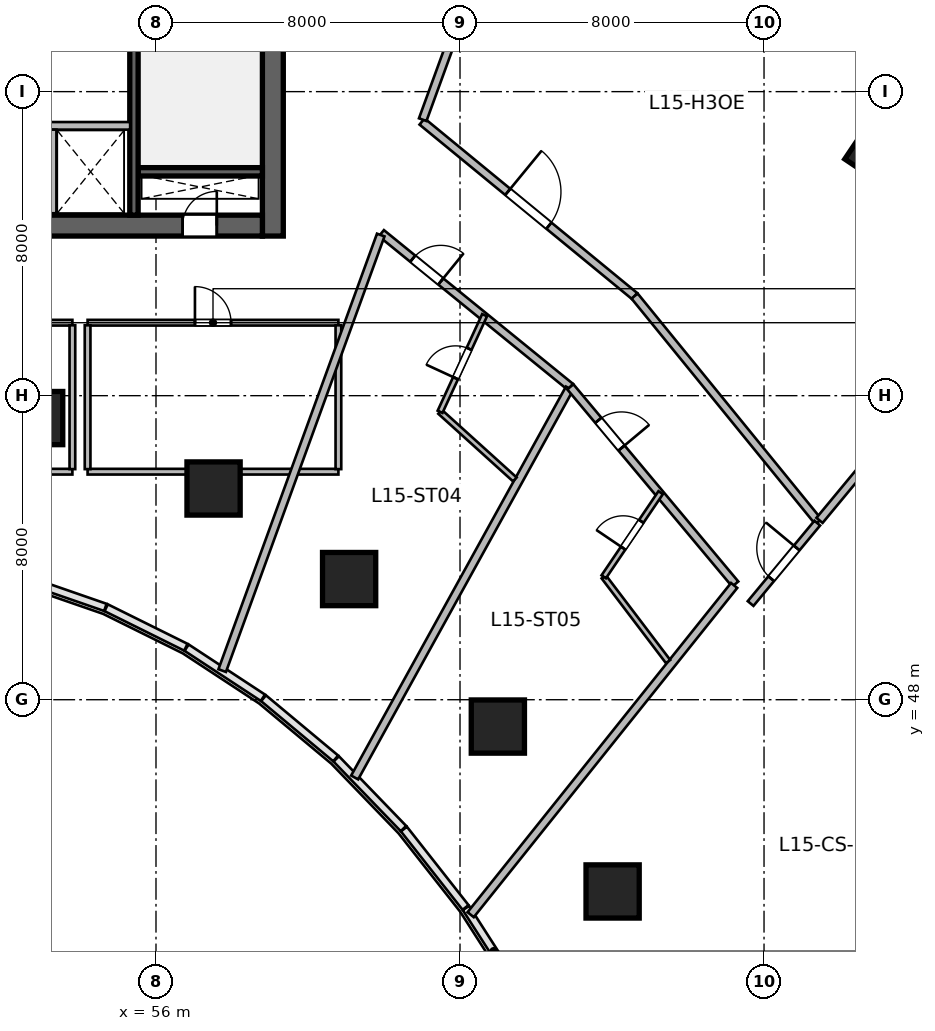
"""IFC4 building model, lengths in metres.
Left out: names, types, materials, properties, quantities, classifications, styles, units other than length and angle.
Written with IfcOpenShell. Run it as: python <this file> out.ifc"""

import sys

from ifc_helpers import new_model, si_unit, direction, frame, frame_2d, origin, origin_2d, place, context, subcontext, project, spatial, rectangle, circle, extrude, source, transform, mapped, element, fill, save


model = new_model("IFC4")
c1 = context("Model", 3, precision=1e-05, world=origin(), true_north=direction((0.0, 1.0)))
c2 = subcontext(c1, "Body", "Model", "MODEL_VIEW")
j1 = project(units=[si_unit("LENGTHUNIT", "METRE"), si_unit("PLANEANGLEUNIT", "RADIAN")], contexts=[c1])
p1 = place(None, origin())
s1 = spatial("IfcSite", under=j1, at=p1, CompositionType="ELEMENT")
p2 = place(p1, origin())
s2 = spatial("IfcBuilding", under=s1, at=p2, CompositionType="ELEMENT")
p3 = place(p2, frame((0.0, 0.0, 67.8)))
s3 = spatial("IfcBuildingStorey", under=s2, at=p3, CompositionType="ELEMENT", Elevation=67.8)
m1 = source(origin(), c2, "Body", "SweptSolid", [
    extrude(rectangle(XDim=12.0, YDim=0.55, at=frame_2d((6.0, 0.0))), origin(), (0.0, 0.0, 1.0), 3.6),
])
p4 = place(p3, frame((59.075, 60.2, 0.0), z_axis=(0.0, 0.0, 1.0), x_axis=(0.0, 1.0, 0.0)))
e1 = element("IfcWall", 1, at=p4, inside=s3, PredefinedType="SHEAR", context=c2, shape_type="MappedRepresentation", body=[
    mapped(m1, transform((0.0, 0.0, 0.0), scale=1.0)),
])
m2 = source(origin(), c2, "Body", "SweptSolid", [
    extrude(rectangle(XDim=21.6, YDim=0.55, at=frame_2d((10.8, 0.0))), origin(), (0.0, 0.0, 1.0), 3.6),
])
p5 = place(p3, frame((37.2, 60.475, 0.0), z_axis=(0.0, 0.0, 1.0), x_axis=(1.0, 0.0, 0.0)))
e2 = element("IfcWall", 2, at=p5, inside=s3, PredefinedType="SHEAR", context=c2, shape_type="MappedRepresentation", body=[
    mapped(m2, transform((0.0, 0.0, 0.0), scale=1.0)),
])
p6 = place(p5, frame((1.1, 0.0, 0.0)))
e3 = element("IfcOpeningElement", 3, at=p6, cuts=e2, PredefinedType="OPENING", context=c2, shape_type="SweptSolid", body=[
    extrude(rectangle(XDim=1.15, YDim=2.15, at=frame_2d((0.575, 1.075))), frame((0.0, 0.285, 0.0), z_axis=(0.0, -1.0, 0.0), x_axis=(1.0, 0.0, 0.0)), (0.0, 0.0, 1.0), 0.57),
])
p7 = place(p5, frame((19.5, 0.0, 0.0)))
e4 = element("IfcOpeningElement", 4, at=p7, cuts=e2, PredefinedType="OPENING", context=c2, shape_type="SweptSolid", body=[
    extrude(rectangle(XDim=0.9, YDim=2.1, at=frame_2d((0.45, 1.05))), frame((0.0, 0.285, 0.0), z_axis=(0.0, -1.0, 0.0), x_axis=(1.0, 0.0, 0.0)), (0.0, 0.0, 1.0), 0.57),
])
p8 = place(p5, frame((12.02, 0.0, 0.0)))
e5 = element("IfcOpeningElement", 5, at=p8, cuts=e2, PredefinedType="OPENING", context=c2, shape_type="SweptSolid", body=[
    extrude(rectangle(XDim=1.6, YDim=2.15, at=frame_2d((0.8, 1.075))), frame((0.0, 0.285, 0.0), z_axis=(0.0, -1.0, 0.0), x_axis=(1.0, 0.0, 0.0)), (0.0, 0.0, 1.0), 0.57),
])
m3 = source(origin(), c2, "Body", "SweptSolid", [
    extrude(rectangle(XDim=3.27, YDim=0.22, at=frame_2d((1.635, 0.0))), origin(), (0.0, 0.0, 1.0), 3.6),
])
p9 = place(p3, frame((55.53, 61.89, 0.0), z_axis=(0.0, 0.0, 1.0), x_axis=(1.0, 0.0, 0.0)))
e6 = element("IfcWall", 6, at=p9, inside=s3, PredefinedType="SHEAR", context=c2, shape_type="MappedRepresentation", body=[
    mapped(m3, transform((0.0, 0.0, 0.0), scale=1.0)),
])
m4 = source(origin(), c2, "Body", "SweptSolid", [
    extrude(rectangle(XDim=10.9, YDim=0.22, at=frame_2d((5.45, 0.0))), origin(), (0.0, 0.0, 1.0), 3.6),
])
p10 = place(p3, frame((55.42, 60.75, 0.0), z_axis=(0.0, 0.0, 1.0), x_axis=(0.0, 1.0, 0.0)))
e7 = element("IfcWall", 7, at=p10, inside=s3, PredefinedType="SHEAR", context=c2, shape_type="MappedRepresentation", body=[
    mapped(m4, transform((0.0, 0.0, 0.0), scale=1.0)),
])
p11 = place(p10, frame((9.495, 0.0, 0.0)))
e8 = element("IfcOpeningElement", 8, at=p11, cuts=e7, PredefinedType="OPENING", context=c2, shape_type="SweptSolid", body=[
    extrude(rectangle(XDim=1.15, YDim=2.15, at=frame_2d((0.575, 1.075))), frame((0.0, 0.12, 0.0), z_axis=(0.0, -1.0, 0.0), x_axis=(1.0, 0.0, 0.0)), (0.0, 0.0, 1.0), 0.24),
])
m5 = source(origin(), c2, "Body", "SweptSolid", [
    extrude(circle(Radius=0.7, at=origin_2d()), origin(), (0.0, 0.0, 1.0), 3.6),
])
for number, where, z_axis, x_axis in (
    (9, (52.846, 55.411, 0.0), (0.0, 0.0, 1.0), (0.143, 0.99, 0.0)),
    (10, (57.515, 53.558, 0.0), (0.0, 0.0, 1.0), (0.289, 0.957, 0.0)),
    (11, (61.082, 51.175, 0.0), (0.0, 0.0, 1.0), (0.409, 0.912, 0.0)),
    (12, (64.996, 47.294, 0.0), (0.0, 0.0, 1.0), (0.558, 0.83, 0.0)),
):
    element("IfcColumn", number, at=place(p3, frame(where, z_axis=z_axis, x_axis=x_axis)), inside=s3, PredefinedType="COLUMN", context=c2, shape_type="MappedRepresentation", body=[
        mapped(m5, transform((0.0, 0.0, 0.0), scale=1.0)),
    ])
m6 = source(origin(), c2, "Body", "SweptSolid", [
    extrude(rectangle(XDim=1.5, YDim=1.5, at=origin_2d()), origin(), (0.0, 0.0, 1.0), 3.6),
])
p12 = place(p3, frame((75.167, 62.43, 0.0), z_axis=(0.0, 0.0, 1.0), x_axis=(0.55774510898, 0.830012285095, 0.0)))
e13 = element("IfcColumn", 13, at=p12, inside=s3, PredefinedType="COLUMN", context=c2, shape_type="MappedRepresentation", body=[
    mapped(m6, transform((0.0, 0.0, 0.0), scale=1.0)),
])
p13 = place(p3, frame((68.015, 42.955, 0.0), z_axis=(0.0, 0.0, 1.0), x_axis=(0.690756218984, 0.723087716626, 0.0)))
e14 = element("IfcColumn", 14, at=p13, inside=s3, PredefinedType="COLUMN", context=c2, shape_type="MappedRepresentation", body=[
    mapped(m5, transform((0.0, 0.0, 0.0), scale=1.0)),
])
m7 = source(origin(), c2, "Body", "SweptSolid", [
    extrude(rectangle(XDim=4.1, YDim=0.2, at=frame_2d((2.05, 0.0))), origin(), (0.0, 0.0, 1.0), 3.36),
])
p14 = place(p3, frame((51.22, 63.1, 0.0), z_axis=(0.0, 0.0, 1.0), x_axis=(1.0, 0.0, 0.0)))
e15 = element("IfcWall", 15, at=p14, inside=s3, PredefinedType="SOLIDWALL", context=c2, shape_type="MappedRepresentation", body=[
    mapped(m7, transform((0.0, 0.0, 0.0), scale=1.0)),
])
m8 = source(origin(), c2, "Body", "SweptSolid", [
    extrude(rectangle(XDim=2.2, YDim=0.2, at=frame_2d((1.1, 0.0))), origin(), (0.0, 0.0, 1.0), 3.36),
])
p15 = place(p3, frame((53.28, 60.8, 0.0), z_axis=(0.0, 0.0, 1.0), x_axis=(0.0, 1.0, 0.0)))
e16 = element("IfcWall", 16, at=p15, inside=s3, PredefinedType="SOLIDWALL", context=c2, shape_type="MappedRepresentation", body=[
    mapped(m8, transform((0.0, 0.0, 0.0), scale=1.0)),
])
m9 = source(origin(), c2, "Body", "SweptSolid", [
    extrude(rectangle(XDim=11.6, YDim=0.15, at=frame_2d((5.8, 0.0))), origin(), (0.0, 0.0, 1.0), 3.36),
])
p16 = place(p3, frame((42.2, 54.0, 0.0), z_axis=(0.0, 0.0, 1.0), x_axis=(1.0, 0.0, 0.0)))
e17 = element("IfcWall", 17, at=p16, inside=s3, PredefinedType="PARTITIONING", context=c2, shape_type="MappedRepresentation", body=[
    mapped(m9, transform((0.0, 0.0, 0.0), scale=1.0)),
])
p17 = place(p3, frame((42.2, 57.92, 0.0), z_axis=(0.0, 0.0, 1.0), x_axis=(1.0, 0.0, 0.0)))
e18 = element("IfcWall", 18, at=p17, inside=s3, PredefinedType="PARTITIONING", context=c2, shape_type="MappedRepresentation", body=[
    mapped(m9, transform((0.0, 0.0, 0.0), scale=1.0)),
])
p18 = place(p17, frame((6.9, 0.0, 0.0)))
e19 = element("IfcOpeningElement", 19, at=p18, cuts=e18, PredefinedType="OPENING", context=c2, shape_type="SweptSolid", body=[
    extrude(rectangle(XDim=1.1, YDim=2.15, at=frame_2d((0.55, 1.075))), frame((0.0, 0.085, 0.0), z_axis=(0.0, -1.0, 0.0), x_axis=(1.0, 0.0, 0.0)), (0.0, 0.0, 1.0), 0.17),
])
m10 = source(origin(), c2, "Body", "SweptSolid", [
    extrude(rectangle(XDim=3.785, YDim=0.15, at=frame_2d((1.893, 0.0))), origin(), (0.0, 0.0, 1.0), 3.36),
])
p19 = place(p3, frame((53.8, 54.067, 0.0), z_axis=(0.0, 0.0, 1.0), x_axis=(0.0, 1.0, 0.0)))
e20 = element("IfcWall", 20, at=p19, inside=s3, PredefinedType="PARTITIONING", context=c2, shape_type="MappedRepresentation", body=[
    mapped(m10, transform((0.0, 0.0, 0.0), scale=1.0)),
])
m11 = source(origin(), c2, "Body", "SweptSolid", [
    extrude(rectangle(XDim=6.6, YDim=0.15, at=frame_2d((3.3, 0.0))), origin(), (0.0, 0.0, 1.0), 2.803),
])
p20 = place(p3, frame((54.2, 54.0, 0.0), z_axis=(0.0, 0.0, 1.0), x_axis=(1.0, 0.0, 0.0)))
e21 = element("IfcWall", 21, at=p20, inside=s3, PredefinedType="PARTITIONING", context=c2, shape_type="MappedRepresentation", body=[
    mapped(m11, transform((0.0, 0.0, 0.0), scale=1.0)),
])
m12 = source(origin(), c2, "Body", "SweptSolid", [
    extrude(rectangle(XDim=6.6, YDim=0.15, at=frame_2d((3.3, 0.0))), origin(), (0.0, 0.0, 1.0), 3.36),
])
p21 = place(p3, frame((54.2, 57.92, 0.0), z_axis=(0.0, 0.0, 1.0), x_axis=(1.0, 0.0, 0.0)))
e22 = element("IfcWall", 22, at=p21, inside=s3, PredefinedType="PARTITIONING", context=c2, shape_type="MappedRepresentation", body=[
    mapped(m12, transform((0.0, 0.0, 0.0), scale=1.0)),
])
p22 = place(p21, frame((2.825, 0.0, 0.0)))
e23 = element("IfcOpeningElement", 23, at=p22, cuts=e22, PredefinedType="OPENING", context=c2, shape_type="SweptSolid", body=[
    extrude(rectangle(XDim=0.95, YDim=2.1, at=frame_2d((0.475, 1.05))), frame((0.0, 0.085, 0.0), z_axis=(0.0, -1.0, 0.0), x_axis=(1.0, 0.0, 0.0)), (0.0, 0.0, 1.0), 0.17),
])
for number, where, z_axis, x_axis in (
    (24, (54.2, 54.067, 0.0), (0.0, 0.0, 1.0), (0.0, 1.0, 0.0)),
    (25, (60.8, 54.067, 0.0), (0.0, 0.0, 1.0), (0.0, 1.0, 0.0)),
):
    element("IfcWall", number, at=place(p3, frame(where, z_axis=z_axis, x_axis=x_axis)), inside=s3, PredefinedType="PARTITIONING", context=c2, shape_type="MappedRepresentation", body=[
        mapped(m10, transform((0.0, 0.0, 0.0), scale=1.0)),
    ])
m13 = source(origin(), c2, "Body", "SweptSolid", [
    extrude(rectangle(XDim=7.237, YDim=0.21, at=frame_2d((3.618, 0.0))), origin(), (0.0, 0.0, 1.0), 3.36),
])
p23 = place(p3, frame((63.001, 63.214, 0.0), z_axis=(0.0, 0.0, 1.0), x_axis=(0.772813707793, -0.634632943557, 0.0)))
e26 = element("IfcWall", 26, at=p23, inside=s3, PredefinedType="PARTITIONING", context=c2, shape_type="MappedRepresentation", body=[
    mapped(m13, transform((0.0, 0.0, 0.0), scale=1.0)),
])
p24 = place(p23, frame((2.918, 0.0, 0.0)))
e27 = element("IfcOpeningElement", 27, at=p24, cuts=e26, PredefinedType="OPENING", context=c2, shape_type="SweptSolid", body=[
    extrude(rectangle(XDim=1.4, YDim=2.15, at=frame_2d((0.7, 1.075))), frame((0.0, 0.115, 0.0), z_axis=(0.0, -1.0, 0.0), x_axis=(1.0, 0.0, 0.0)), (0.0, 0.0, 1.0), 0.23),
])
m14 = source(origin(), c2, "Body", "SweptSolid", [
    extrude(rectangle(XDim=7.659, YDim=0.21, at=frame_2d((3.829, 0.0))), origin(), (0.0, 0.0, 1.0), 3.36),
])
p25 = place(p3, frame((68.594, 58.621, 0.0), z_axis=(0.0, 0.0, 1.0), x_axis=(0.631489868862, -0.775384127723, 0.0)))
e28 = element("IfcWall", 28, at=p25, inside=s3, PredefinedType="PARTITIONING", context=c2, shape_type="MappedRepresentation", body=[
    mapped(m14, transform((0.0, 0.0, 0.0), scale=1.0)),
])
m15 = source(origin(), c2, "Body", "SweptSolid", [
    extrude(rectangle(XDim=12.088, YDim=0.21, at=frame_2d((6.044, 0.0))), origin(), (0.0, 0.0, 1.0), 3.36),
])
p26 = place(p3, frame((63.019, 63.262, 0.0), z_axis=(0.0, 0.0, 1.0), x_axis=(0.34203007529, 0.939689005787, 0.0)))
e29 = element("IfcWall", 29, at=p26, inside=s3, PredefinedType="PARTITIONING", context=c2, shape_type="MappedRepresentation", body=[
    mapped(m15, transform((0.0, 0.0, 0.0), scale=1.0)),
])
m16 = source(origin(), c2, "Body", "SweptSolid", [
    extrude(rectangle(XDim=10.975, YDim=0.21, at=frame_2d((5.487, 0.0))), origin(), (0.0, 0.0, 1.0), 3.36),
])
p27 = place(p3, frame((73.46, 52.719, 0.0), z_axis=(0.0, 0.0, 1.0), x_axis=(0.638125265812, 0.769932558821, 0.0)))
e30 = element("IfcWall", 30, at=p27, inside=s3, PredefinedType="PARTITIONING", context=c2, shape_type="MappedRepresentation", body=[
    mapped(m16, transform((0.0, 0.0, 0.0), scale=1.0)),
])
m17 = source(origin(), c2, "Body", "SweptSolid", [
    extrude(rectangle(XDim=6.408, YDim=0.21, at=frame_2d((3.204, 0.0))), origin(), (0.0, 0.0, 1.0), 3.36),
])
p28 = place(p3, frame((61.931, 60.275, 0.0), z_axis=(0.0, 0.0, 1.0), x_axis=(0.775878552904, -0.630882295792, 0.0)))
e31 = element("IfcWall", 31, at=p28, inside=s3, PredefinedType="PARTITIONING", context=c2, shape_type="MappedRepresentation", body=[
    mapped(m17, transform((0.0, 0.0, 0.0), scale=1.0)),
])
p29 = place(p28, frame((1.063, 0.0, 0.0)))
e32 = element("IfcOpeningElement", 32, at=p29, cuts=e31, PredefinedType="OPENING", context=c2, shape_type="SweptSolid", body=[
    extrude(rectangle(XDim=0.95, YDim=2.15, at=frame_2d((0.475, 1.075))), frame((0.0, 0.115, 0.0), z_axis=(0.0, -1.0, 0.0), x_axis=(1.0, 0.0, 0.0)), (0.0, 0.0, 1.0), 0.23),
])
m18 = source(origin(), c2, "Body", "SweptSolid", [
    extrude(rectangle(XDim=12.196, YDim=0.21, at=frame_2d((6.098, 0.0))), origin(), (0.0, 0.0, 1.0), 3.36),
])
p30 = place(p3, frame((57.742, 48.766, 0.0), z_axis=(0.0, 0.0, 1.0), x_axis=(0.342022711534, 0.939691686031, 0.0)))
e33 = element("IfcWall", 33, at=p30, inside=s3, PredefinedType="PARTITIONING", context=c2, shape_type="MappedRepresentation", body=[
    mapped(m18, transform((0.0, 0.0, 0.0), scale=1.0)),
])
m19 = source(origin(), c2, "Body", "SweptSolid", [
    extrude(rectangle(XDim=11.692, YDim=0.21, at=frame_2d((5.846, 0.0))), origin(), (0.0, 0.0, 1.0), 3.093),
])
p31 = place(p3, frame((61.228, 45.954, 0.0), z_axis=(0.0, 0.0, 1.0), x_axis=(0.483398579324, 0.875400373262, 0.0)))
e34 = element("IfcWall", 34, at=p31, inside=s3, PredefinedType="PARTITIONING", context=c2, shape_type="MappedRepresentation", body=[
    mapped(m19, transform((0.0, 0.0, 0.0), scale=1.0)),
])
m20 = source(origin(), c2, "Body", "SweptSolid", [
    extrude(rectangle(XDim=2.653, YDim=0.14, at=frame_2d((1.327, 0.0))), origin(), (0.0, 0.0, 1.0), 2.877),
])
p32 = place(p3, frame((63.475, 55.576, 0.0), z_axis=(0.0, 0.0, 1.0), x_axis=(0.741731938744, -0.67069645224, 0.0)))
e35 = element("IfcWall", 35, at=p32, inside=s3, PredefinedType="PARTITIONING", context=c2, shape_type="MappedRepresentation", body=[
    mapped(m20, transform((0.0, 0.0, 0.0), scale=1.0)),
])
m21 = source(origin(), c2, "Body", "SweptSolid", [
    extrude(rectangle(XDim=2.799, YDim=0.14, at=frame_2d((1.4, 0.0))), origin(), (0.0, 0.0, 1.0), 3.36),
])
p33 = place(p3, frame((63.475, 55.576, 0.0), z_axis=(0.0, 0.0, 1.0), x_axis=(0.418626740412, 0.908158384981, 0.0)))
e36 = element("IfcWall", 36, at=p33, inside=s3, PredefinedType="PARTITIONING", context=c2, shape_type="MappedRepresentation", body=[
    mapped(m21, transform((0.0, 0.0, 0.0), scale=1.0)),
])
p34 = place(p33, frame((0.975, 0.0, 0.0)))
e37 = element("IfcOpeningElement", 37, at=p34, cuts=e36, PredefinedType="OPENING", context=c2, shape_type="SweptSolid", body=[
    extrude(rectangle(XDim=0.85, YDim=2.05, at=frame_2d((0.425, 1.025))), frame((0.0, 0.08, 0.0), z_axis=(0.0, -1.0, 0.0), x_axis=(1.0, 0.0, 0.0)), (0.0, 0.0, 1.0), 0.16),
])
m22 = source(origin(), c2, "Body", "SweptSolid", [
    extrude(rectangle(XDim=6.764, YDim=0.21, at=frame_2d((3.382, 0.0))), origin(), (0.0, 0.0, 1.0), 3.36),
])
p35 = place(p3, frame((66.904, 56.232, 0.0), z_axis=(0.0, 0.0, 1.0), x_axis=(0.641433176235, -0.767178910311, 0.0)))
e38 = element("IfcWall", 38, at=p35, inside=s3, PredefinedType="PARTITIONING", context=c2, shape_type="MappedRepresentation", body=[
    mapped(m22, transform((0.0, 0.0, 0.0), scale=1.0)),
])
p36 = place(p35, frame((1.148, 0.0, 0.0)))
e39 = element("IfcOpeningElement", 39, at=p36, cuts=e38, PredefinedType="OPENING", context=c2, shape_type="SweptSolid", body=[
    extrude(rectangle(XDim=0.95, YDim=2.15, at=frame_2d((0.475, 1.075))), frame((0.0, 0.115, 0.0), z_axis=(0.0, -1.0, 0.0), x_axis=(1.0, 0.0, 0.0)), (0.0, 0.0, 1.0), 0.23),
])
m23 = source(origin(), c2, "Body", "SweptSolid", [
    extrude(rectangle(XDim=11.095, YDim=0.21, at=frame_2d((5.548, 0.0))), origin(), (0.0, 0.0, 1.0), 3.093),
])
p37 = place(p3, frame((64.281, 42.344, 0.0), z_axis=(0.0, 0.0, 1.0), x_axis=(0.6248131083, 0.780774346208, 0.0)))
e40 = element("IfcWall", 40, at=p37, inside=s3, PredefinedType="PARTITIONING", context=c2, shape_type="MappedRepresentation", body=[
    mapped(m23, transform((0.0, 0.0, 0.0), scale=1.0)),
])
m24 = source(origin(), c2, "Body", "SweptSolid", [
    extrude(rectangle(XDim=2.8, YDim=0.14, at=frame_2d((1.4, 0.0))), origin(), (0.0, 0.0, 1.0), 2.877),
])
p38 = place(p3, frame((67.782, 51.234, 0.0), z_axis=(0.0, 0.0, 1.0), x_axis=(0.604607833789, -0.796523299923, 0.0)))
e41 = element("IfcWall", 41, at=p38, inside=s3, PredefinedType="PARTITIONING", context=c2, shape_type="MappedRepresentation", body=[
    mapped(m24, transform((0.0, 0.0, 0.0), scale=1.0)),
])
m25 = source(origin(), c2, "Body", "SweptSolid", [
    extrude(rectangle(XDim=2.673, YDim=0.14, at=frame_2d((1.336, 0.0))), origin(), (0.0, 0.0, 1.0), 2.644),
])
p39 = place(p3, frame((67.782, 51.234, 0.0), z_axis=(0.0, 0.0, 1.0), x_axis=(0.560399679065, 0.828222312972, 0.0)))
e42 = element("IfcWall", 42, at=p39, inside=s3, PredefinedType="PARTITIONING", context=c2, shape_type="MappedRepresentation", body=[
    mapped(m25, transform((0.0, 0.0, 0.0), scale=1.0)),
])
p40 = place(p39, frame((0.911, 0.0, 0.0)))
e43 = element("IfcOpeningElement", 43, at=p40, cuts=e42, PredefinedType="OPENING", context=c2, shape_type="SweptSolid", body=[
    extrude(rectangle(XDim=0.85, YDim=2.05, at=frame_2d((0.425, 1.025))), frame((0.0, 0.08, 0.0), z_axis=(0.0, -1.0, 0.0), x_axis=(1.0, 0.0, 0.0)), (0.0, 0.0, 1.0), 0.16),
])
m26 = source(origin(), c2, "Body", "SweptSolid", [
    extrude(rectangle(XDim=2.748, YDim=0.195, at=frame_2d((1.374, 0.0))), origin(), (0.0, 0.0, 1.0), 3.36),
])
p41 = place(p3, frame((71.647, 50.531, 0.0), z_axis=(0.0, 0.0, 1.0), x_axis=(0.638111168284, 0.769944242729, 0.0)))
e44 = element("IfcWall", 44, at=p41, inside=s3, PredefinedType="PARTITIONING", context=c2, shape_type="MappedRepresentation", body=[
    mapped(m26, transform((0.0, 0.0, 0.0), scale=1.0)),
])
p42 = place(p41, frame((0.849, 0.0, 0.0)))
e45 = element("IfcOpeningElement", 45, at=p42, cuts=e44, PredefinedType="OPENING", context=c2, shape_type="SweptSolid", body=[
    extrude(rectangle(XDim=1.05, YDim=2.15, at=frame_2d((0.525, 1.075))), frame((0.0, 0.107, 0.0), z_axis=(0.0, -1.0, 0.0), x_axis=(1.0, 0.0, 0.0)), (0.0, 0.0, 1.0), 0.215),
])
m27 = source(origin(), c2, "Body", "SweptSolid", [
    extrude(rectangle(XDim=0.9, YDim=2.1, at=frame_2d((0.45, 1.05))), frame((0.0, 0.025, 0.0), z_axis=(0.0, -1.0, 0.0), x_axis=(1.0, 0.0, 0.0)), (0.0, 0.0, 1.0), 0.05),
])
p43 = place(p7, origin())
e46 = element("IfcDoor", 46, at=p43, inside=s3, OperationType="SINGLE_SWING_RIGHT", PredefinedType="DOOR", context=c2, shape_type="MappedRepresentation", body=[
    mapped(m27, transform((0.0, 0.0, 0.0), scale=1.0)),
])
fill(e4, e46)
m28 = source(origin(), c2, "Body", "SweptSolid", [
    extrude(rectangle(XDim=0.95, YDim=2.1, at=frame_2d((0.475, 1.05))), frame((0.0, 0.025, 0.0), z_axis=(0.0, -1.0, 0.0), x_axis=(1.0, 0.0, 0.0)), (0.0, 0.0, 1.0), 0.05),
])
p44 = place(p22, origin())
e47 = element("IfcDoor", 47, at=p44, inside=s3, OperationType="SINGLE_SWING_LEFT", PredefinedType="DOOR", context=c2, shape_type="MappedRepresentation", body=[
    mapped(m28, transform((0.0, 0.0, 0.0), scale=1.0)),
])
fill(e23, e47)
m29 = source(origin(), c2, "Body", "SweptSolid", [
    extrude(rectangle(XDim=1.4, YDim=2.15, at=frame_2d((0.7, 1.075))), frame((0.0, 0.025, 0.0), z_axis=(0.0, -1.0, 0.0), x_axis=(1.0, 0.0, 0.0)), (0.0, 0.0, 1.0), 0.05),
])
p45 = place(p24, origin())
e48 = element("IfcDoor", 48, at=p45, inside=s3, OperationType="SINGLE_SWING_LEFT", PredefinedType="DOOR", context=c2, shape_type="MappedRepresentation", body=[
    mapped(m29, transform((0.0, 0.0, 0.0), scale=1.0)),
])
fill(e27, e48)
m30 = source(origin(), c2, "Body", "SweptSolid", [
    extrude(rectangle(XDim=0.95, YDim=2.15, at=frame_2d((0.475, 1.075))), frame((0.0, 0.025, 0.0), z_axis=(0.0, -1.0, 0.0), x_axis=(1.0, 0.0, 0.0)), (0.0, 0.0, 1.0), 0.05),
])
p46 = place(p29, origin())
e49 = element("IfcDoor", 49, at=p46, inside=s3, OperationType="SINGLE_SWING_RIGHT", PredefinedType="DOOR", context=c2, shape_type="MappedRepresentation", body=[
    mapped(m30, transform((0.0, 0.0, 0.0), scale=1.0)),
])
fill(e32, e49)
m31 = source(origin(), c2, "Body", "SweptSolid", [
    extrude(rectangle(XDim=0.85, YDim=2.05, at=frame_2d((0.425, 1.025))), frame((0.0, 0.025, 0.0), z_axis=(0.0, -1.0, 0.0), x_axis=(1.0, 0.0, 0.0)), (0.0, 0.0, 1.0), 0.05),
])
p47 = place(p34, origin())
e50 = element("IfcDoor", 50, at=p47, inside=s3, OperationType="SINGLE_SWING_LEFT", PredefinedType="DOOR", context=c2, shape_type="MappedRepresentation", body=[
    mapped(m31, transform((0.0, 0.0, 0.0), scale=1.0)),
])
fill(e37, e50)
p48 = place(p36, origin())
e51 = element("IfcDoor", 51, at=p48, inside=s3, OperationType="SINGLE_SWING_RIGHT", PredefinedType="DOOR", context=c2, shape_type="MappedRepresentation", body=[
    mapped(m30, transform((0.0, 0.0, 0.0), scale=1.0)),
])
fill(e39, e51)
p49 = place(p40, origin())
e52 = element("IfcDoor", 52, at=p49, inside=s3, OperationType="SINGLE_SWING_LEFT", PredefinedType="DOOR", context=c2, shape_type="MappedRepresentation", body=[
    mapped(m31, transform((0.0, 0.0, 0.0), scale=1.0)),
])
fill(e43, e52)
m32 = source(origin(), c2, "Body", "SweptSolid", [
    extrude(rectangle(XDim=1.05, YDim=2.15, at=frame_2d((0.525, 1.075))), frame((0.0, 0.025, 0.0), z_axis=(0.0, -1.0, 0.0), x_axis=(1.0, 0.0, 0.0)), (0.0, 0.0, 1.0), 0.05),
])
p50 = place(p42, origin())
e53 = element("IfcDoor", 53, at=p50, inside=s3, OperationType="SINGLE_SWING_RIGHT", PredefinedType="DOOR", context=c2, shape_type="MappedRepresentation", body=[
    mapped(m32, transform((0.0, 0.0, 0.0), scale=1.0)),
])
fill(e45, e53)
save(model, sys.argv[1])
